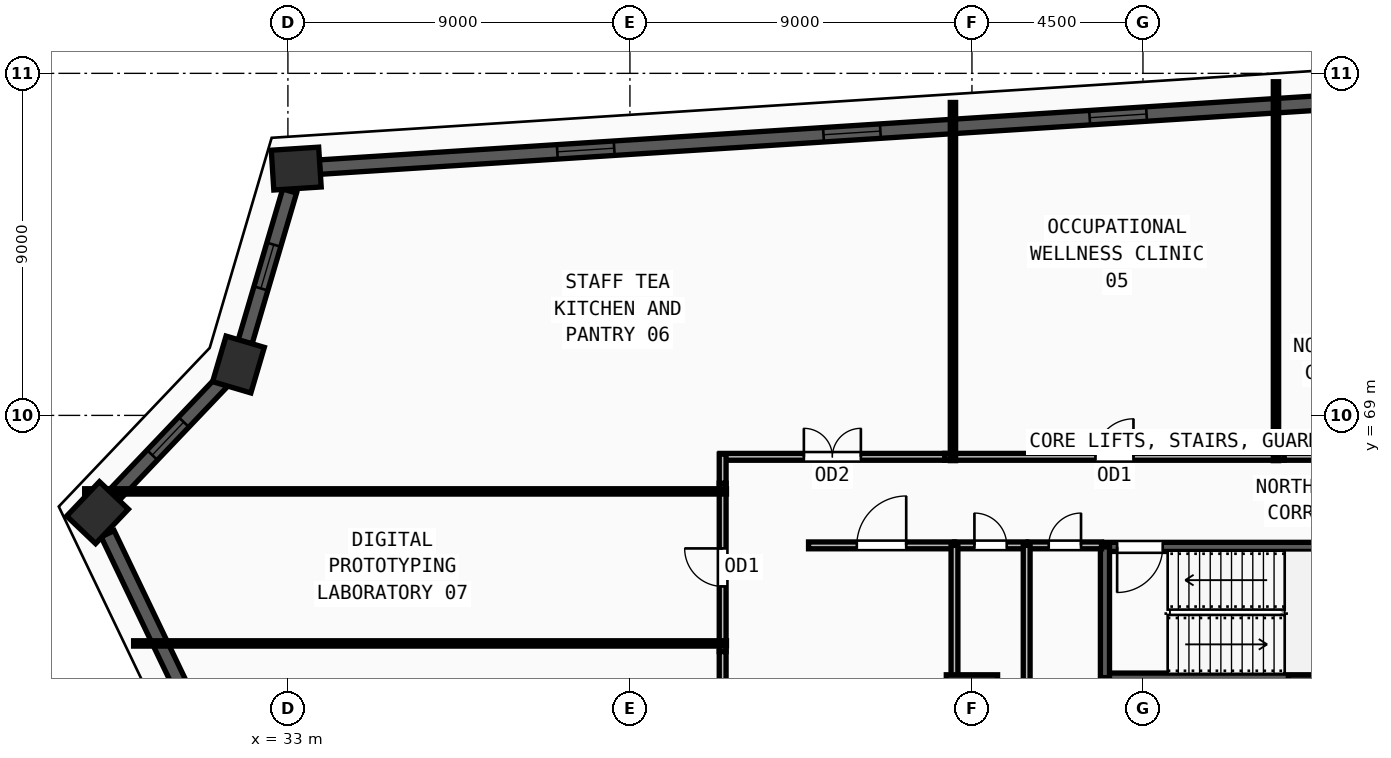
"""IFC4 building model, lengths in metres.
Left out: names, types, materials, properties, quantities, classifications, styles, units other than length and angle.
Written with IfcOpenShell. Run it as: python <this file> out.ifc"""

import sys

from ifc_helpers import new_model, si_unit, direction, frame, frame_2d, origin, origin_2d, place, context, subcontext, project, spatial, rectangle, extrude, source, transform, mapped, element, fill, save


model = new_model("IFC4")
c1 = context("Model", 3, precision=1e-05, world=origin(), true_north=direction((0.0, 1.0)))
c2 = subcontext(c1, "Body", "Model", "MODEL_VIEW")
j1 = project(units=[si_unit("LENGTHUNIT", "METRE"), si_unit("PLANEANGLEUNIT", "RADIAN")], contexts=[c1])
p1 = place(None, origin())
s1 = spatial("IfcSite", under=j1, at=p1, CompositionType="ELEMENT")
p2 = place(p1, origin())
s2 = spatial("IfcBuilding", under=s1, at=p2, CompositionType="ELEMENT")
p3 = place(p2, frame((0.0, 0.0, 247.5)))
s3 = spatial("IfcBuildingStorey", under=s2, at=p3, CompositionType="ELEMENT", Elevation=247.5)
m1 = source(origin(), c2, "Body", "SweptSolid", [
    extrude(rectangle(XDim=1.35, YDim=1.35, at=origin_2d()), origin(), (0.0, 0.0, 1.0), 3.75),
])
for number, where, z_axis, x_axis in (
    (1, (60.0, 61.5, 0.0), (0.0, 0.0, 1.0), (1.0, 0.0, 0.0)),
    (2, (51.0, 61.5, 0.0), (0.0, 0.0, 1.0), (1.0, 0.0, 0.0)),
):
    element("IfcColumn", number, at=place(p3, frame(where, z_axis=z_axis, x_axis=x_axis)), inside=s3, PredefinedType="COLUMN", context=c2, shape_type="MappedRepresentation", body=[
        mapped(m1, transform((0.0, 0.0, 0.0), x_axis=(1.0, 0.0, 0.0), y_axis=(0.0, 1.0, 0.0), z_axis=(0.0, 0.0, 1.0), scale=1.0)),
    ])
m2 = source(origin(), c2, "Body", "SweptSolid", [
    extrude(rectangle(XDim=1.25, YDim=1.05, at=origin_2d()), origin(), (0.0, 0.0, 1.0), 3.75),
])
for number, where, z_axis, x_axis in (
    (3, (27.99, 66.441, 0.0), (0.0, 0.0, 1.0), (0.689, 0.724, 0.0)),
    (4, (31.699, 70.339, 0.0), (0.0, 0.0, 1.0), (0.283, 0.959, 0.0)),
    (5, (33.219, 75.494, 0.0), (0.0, 0.0, 1.0), (0.998, 0.064, 0.0)),
):
    element("IfcColumn", number, at=place(p3, frame(where, z_axis=z_axis, x_axis=x_axis)), inside=s3, PredefinedType="COLUMN", context=c2, shape_type="MappedRepresentation", body=[
        mapped(m2, transform((0.0, 0.0, 0.0), x_axis=(1.0, 0.0, 0.0), y_axis=(0.0, 1.0, 0.0), z_axis=(0.0, 0.0, 1.0), scale=1.0)),
    ])
p4 = place(p3, frame((61.85, 77.331, 0.0), z_axis=(0.0, 0.0, 1.0), x_axis=(-0.997946898195, -0.064046767155, 0.0)))
e6 = element("IfcWall", 6, at=p4, inside=s3, PredefinedType="SOLIDWALL", context=c2, shape_type="SweptSolid", body=[
    extrude(rectangle(XDim=28.075, YDim=0.38, at=frame_2d((14.037, 0.0))), origin(), (0.0, 0.0, 1.0), 3.57),
])
m3 = source(origin(), c2, "Body", "SweptSolid", [
    extrude(rectangle(XDim=1.5, YDim=1.9, at=frame_2d((0.75, 0.95))), frame((0.0, 0.2, 0.0), z_axis=(0.0, -1.0, 0.0), x_axis=(1.0, 0.0, 0.0)), (0.0, 0.0, 1.0), 0.4),
])
p5 = place(p4, frame((6.269, 0.0, 0.55)))
e7 = element("IfcOpeningElement", 7, at=p5, cuts=e6, PredefinedType="OPENING", context=c2, shape_type="MappedRepresentation", body=[
    mapped(m3, transform((0.0, 0.0, 0.0), x_axis=(1.0, 0.0, 0.0), y_axis=(0.0, 1.0, 0.0), z_axis=(0.0, 0.0, 1.0), scale=1.0)),
])
p6 = place(p4, frame((13.287, 0.0, 0.55)))
e8 = element("IfcOpeningElement", 8, at=p6, cuts=e6, PredefinedType="OPENING", context=c2, shape_type="MappedRepresentation", body=[
    mapped(m3, transform((0.0, 0.0, 0.0), x_axis=(1.0, 0.0, 0.0), y_axis=(0.0, 1.0, 0.0), z_axis=(0.0, 0.0, 1.0), scale=1.0)),
])
p7 = place(p4, frame((20.306, 0.0, 0.55)))
e9 = element("IfcOpeningElement", 9, at=p7, cuts=e6, PredefinedType="OPENING", context=c2, shape_type="MappedRepresentation", body=[
    mapped(m3, transform((0.0, 0.0, 0.0), x_axis=(1.0, 0.0, 0.0), y_axis=(0.0, 1.0, 0.0), z_axis=(0.0, 0.0, 1.0), scale=1.0)),
])
p8 = place(p3, frame((33.045, 74.904, 0.0), z_axis=(0.0, 0.0, 1.0), x_axis=(-0.282772261865, -0.959187076602, 0.0)))
e10 = element("IfcWall", 10, at=p8, inside=s3, PredefinedType="SOLIDWALL", context=c2, shape_type="SweptSolid", body=[
    extrude(rectangle(XDim=4.144, YDim=0.38, at=frame_2d((2.072, 0.0))), origin(), (0.0, 0.0, 1.0), 3.57),
])
m4 = source(origin(), c2, "Body", "SweptSolid", [
    extrude(rectangle(XDim=1.2, YDim=1.9, at=frame_2d((0.6, 0.95))), frame((0.0, 0.2, 0.0), z_axis=(0.0, -1.0, 0.0), x_axis=(1.0, 0.0, 0.0)), (0.0, 0.0, 1.0), 0.4),
])
p9 = place(p8, frame((1.472, 0.0, 0.55)))
e11 = element("IfcOpeningElement", 11, at=p9, cuts=e10, PredefinedType="OPENING", context=c2, shape_type="MappedRepresentation", body=[
    mapped(m4, transform((0.0, 0.0, 0.0), x_axis=(1.0, 0.0, 0.0), y_axis=(0.0, 1.0, 0.0), z_axis=(0.0, 0.0, 1.0), scale=1.0)),
])
p10 = place(p3, frame((31.275, 69.893, 0.0), z_axis=(0.0, 0.0, 1.0), x_axis=(-0.689387760278, -0.724392515131, 0.0)))
e12 = element("IfcWall", 12, at=p10, inside=s3, PredefinedType="SOLIDWALL", context=c2, shape_type="SweptSolid", body=[
    extrude(rectangle(XDim=4.15, YDim=0.38, at=frame_2d((2.075, 0.0))), origin(), (0.0, 0.0, 1.0), 3.57),
])
p11 = place(p10, frame((1.475, 0.0, 0.55)))
e13 = element("IfcOpeningElement", 13, at=p11, cuts=e12, PredefinedType="OPENING", context=c2, shape_type="MappedRepresentation", body=[
    mapped(m4, transform((0.0, 0.0, 0.0), x_axis=(1.0, 0.0, 0.0), y_axis=(0.0, 1.0, 0.0), z_axis=(0.0, 0.0, 1.0), scale=1.0)),
])
p12 = place(p3, frame((28.256, 65.886, 0.0), z_axis=(0.0, 0.0, 1.0), x_axis=(0.432167516052, -0.901793345545, 0.0)))
e14 = element("IfcWall", 14, at=p12, inside=s3, PredefinedType="SOLIDWALL", context=c2, shape_type="SweptSolid", body=[
    extrude(rectangle(XDim=23.157, YDim=0.38, at=frame_2d((11.579, 0.0))), origin(), (0.0, 0.0, 1.0), 3.57),
])
p13 = place(p12, frame((5.039, 0.0, 0.55)))
e15 = element("IfcOpeningElement", 15, at=p13, cuts=e14, PredefinedType="OPENING", context=c2, shape_type="MappedRepresentation", body=[
    mapped(m3, transform((0.0, 0.0, 0.0), x_axis=(1.0, 0.0, 0.0), y_axis=(0.0, 1.0, 0.0), z_axis=(0.0, 0.0, 1.0), scale=1.0)),
])
p14 = place(p12, frame((10.829, 0.0, 0.55)))
e16 = element("IfcOpeningElement", 16, at=p14, cuts=e14, PredefinedType="OPENING", context=c2, shape_type="MappedRepresentation", body=[
    mapped(m3, transform((0.0, 0.0, 0.0), x_axis=(1.0, 0.0, 0.0), y_axis=(0.0, 1.0, 0.0), z_axis=(0.0, 0.0, 1.0), scale=1.0)),
])
p15 = place(p12, frame((14.418, 0.0, 0.55)))
e17 = element("IfcOpeningElement", 17, at=p15, cuts=e14, PredefinedType="OPENING", context=c2, shape_type="MappedRepresentation", body=[
    mapped(m3, transform((0.0, 0.0, 0.0), x_axis=(1.0, 0.0, 0.0), y_axis=(0.0, 1.0, 0.0), z_axis=(0.0, 0.0, 1.0), scale=1.0)),
])
p16 = place(p3, frame((54.5, 62.1, 0.0), z_axis=(0.0, 0.0, 1.0), x_axis=(1.0, 0.0, 0.0)))
e18 = element("IfcWall", 18, at=p16, inside=s3, PredefinedType="SOLIDWALL", context=c2, shape_type="SweptSolid", body=[
    extrude(rectangle(XDim=7.82, YDim=0.24, at=frame_2d((3.91, 0.0))), origin(), (0.0, 0.0, 1.0), 3.57),
])
p17 = place(p3, frame((62.32, 65.54, 0.0), z_axis=(0.0, 0.0, 1.0), x_axis=(-1.0, 0.0, 0.0)))
e19 = element("IfcWall", 19, at=p17, inside=s3, PredefinedType="SOLIDWALL", context=c2, shape_type="SweptSolid", body=[
    extrude(rectangle(XDim=7.82, YDim=0.24, at=frame_2d((3.91, 0.0))), origin(), (0.0, 0.0, 1.0), 3.57),
])
m5 = source(origin(), c2, "Body", "SweptSolid", [
    extrude(rectangle(XDim=1.2, YDim=2.2, at=frame_2d((0.6, 1.1))), frame((0.0, 0.13, 0.0), z_axis=(0.0, -1.0, 0.0), x_axis=(1.0, 0.0, 0.0)), (0.0, 0.0, 1.0), 0.26),
])
p18 = place(p17, frame((6.3, 0.0, 0.0)))
e20 = element("IfcOpeningElement", 20, at=p18, cuts=e19, PredefinedType="OPENING", context=c2, shape_type="MappedRepresentation", body=[
    mapped(m5, transform((0.0, 0.0, 0.0), x_axis=(1.0, 0.0, 0.0), y_axis=(0.0, 1.0, 0.0), z_axis=(0.0, 0.0, 1.0), scale=1.0)),
])
p19 = place(p3, frame((54.5, 65.54, 0.0), z_axis=(0.0, 0.0, 1.0), x_axis=(0.0, -1.0, 0.0)))
e21 = element("IfcWall", 21, at=p19, inside=s3, PredefinedType="SOLIDWALL", context=c2, shape_type="SweptSolid", body=[
    extrude(rectangle(XDim=3.44, YDim=0.24, at=frame_2d((1.72, 0.0))), origin(), (0.0, 0.0, 1.0), 3.57),
])
p20 = place(p3, frame((50.54, 65.58, 0.0), z_axis=(0.0, 0.0, 1.0), x_axis=(1.0, 0.0, 0.0)))
e22 = element("IfcWall", 22, at=p20, inside=s3, PredefinedType="PARTITIONING", context=c2, shape_type="SweptSolid", body=[
    extrude(rectangle(XDim=1.9, YDim=0.18, at=frame_2d((0.95, 0.0))), origin(), (0.0, 0.0, 1.0), 3.57),
])
m6 = source(origin(), c2, "Body", "SweptSolid", [
    extrude(rectangle(XDim=0.85, YDim=2.1, at=frame_2d((0.425, 1.05))), frame((0.0, 0.1, 0.0), z_axis=(0.0, -1.0, 0.0), x_axis=(1.0, 0.0, 0.0)), (0.0, 0.0, 1.0), 0.2),
])
p21 = place(p20, frame((0.525, 0.0, 0.0)))
e23 = element("IfcOpeningElement", 23, at=p21, cuts=e22, PredefinedType="OPENING", context=c2, shape_type="MappedRepresentation", body=[
    mapped(m6, transform((0.0, 0.0, 0.0), x_axis=(1.0, 0.0, 0.0), y_axis=(0.0, 1.0, 0.0), z_axis=(0.0, 0.0, 1.0), scale=1.0)),
])
p22 = place(p3, frame((52.48, 65.58, 0.0), z_axis=(0.0, 0.0, 1.0), x_axis=(1.0, 0.0, 0.0)))
e24 = element("IfcWall", 24, at=p22, inside=s3, PredefinedType="PARTITIONING", context=c2, shape_type="SweptSolid", body=[
    extrude(rectangle(XDim=1.93, YDim=0.18, at=frame_2d((0.965, 0.0))), origin(), (0.0, 0.0, 1.0), 3.57),
])
p23 = place(p22, frame((0.54, 0.0, 0.0)))
e25 = element("IfcOpeningElement", 25, at=p23, cuts=e24, PredefinedType="OPENING", context=c2, shape_type="MappedRepresentation", body=[
    mapped(m6, transform((0.0, 0.0, 0.0), x_axis=(1.0, 0.0, 0.0), y_axis=(0.0, 1.0, 0.0), z_axis=(0.0, 0.0, 1.0), scale=1.0)),
])
p24 = place(p3, frame((46.7, 65.58, 0.0), z_axis=(0.0, 0.0, 1.0), x_axis=(1.0, 0.0, 0.0)))
e26 = element("IfcWall", 26, at=p24, inside=s3, PredefinedType="PARTITIONING", context=c2, shape_type="SweptSolid", body=[
    extrude(rectangle(XDim=3.84, YDim=0.18, at=frame_2d((1.92, 0.0))), origin(), (0.0, 0.0, 1.0), 3.57),
])
m7 = source(origin(), c2, "Body", "SweptSolid", [
    extrude(rectangle(XDim=1.3, YDim=2.2, at=frame_2d((0.65, 1.1))), frame((0.0, 0.1, 0.0), z_axis=(0.0, -1.0, 0.0), x_axis=(1.0, 0.0, 0.0)), (0.0, 0.0, 1.0), 0.2),
])
p25 = place(p24, frame((1.27, 0.0, 0.0)))
e27 = element("IfcOpeningElement", 27, at=p25, cuts=e26, PredefinedType="OPENING", context=c2, shape_type="MappedRepresentation", body=[
    mapped(m7, transform((0.0, 0.0, 0.0), x_axis=(1.0, 0.0, 0.0), y_axis=(0.0, 1.0, 0.0), z_axis=(0.0, 0.0, 1.0), scale=1.0)),
])
p26 = place(p3, frame((50.285, 67.91, 0.0), z_axis=(0.0, 0.0, 1.0), x_axis=(1.0, 0.0, 0.0)))
e28 = element("IfcWall", 28, at=p26, inside=s3, PredefinedType="PARTITIONING", context=c2, shape_type="SweptSolid", body=[
    extrude(rectangle(XDim=8.93, YDim=0.18, at=frame_2d((4.465, 0.0))), origin(), (0.0, 0.0, 1.0), 3.205),
])
m8 = source(origin(), c2, "Body", "SweptSolid", [
    extrude(rectangle(XDim=1.0, YDim=2.2, at=frame_2d((0.5, 1.1))), frame((0.0, 0.1, 0.0), z_axis=(0.0, -1.0, 0.0), x_axis=(1.0, 0.0, 0.0)), (0.0, 0.0, 1.0), 0.2),
])
p27 = place(p26, frame((3.965, 0.0, 0.0)))
e29 = element("IfcOpeningElement", 29, at=p27, cuts=e28, PredefinedType="OPENING", context=c2, shape_type="MappedRepresentation", body=[
    mapped(m8, transform((0.0, 0.0, 0.0), x_axis=(1.0, 0.0, 0.0), y_axis=(0.0, 1.0, 0.0), z_axis=(0.0, 0.0, 1.0), scale=1.0)),
])
p28 = place(p3, frame((44.37, 67.91, 0.0), z_axis=(0.0, 0.0, 1.0), x_axis=(1.0, 0.0, 0.0)))
e30 = element("IfcWall", 30, at=p28, inside=s3, PredefinedType="PARTITIONING", context=c2, shape_type="SweptSolid", body=[
    extrude(rectangle(XDim=5.915, YDim=0.18, at=frame_2d((2.958, 0.0))), origin(), (0.0, 0.0, 1.0), 3.205),
])
m9 = source(origin(), c2, "Body", "SweptSolid", [
    extrude(rectangle(XDim=1.5, YDim=2.2, at=frame_2d((0.75, 1.1))), frame((0.0, 0.1, 0.0), z_axis=(0.0, -1.0, 0.0), x_axis=(1.0, 0.0, 0.0)), (0.0, 0.0, 1.0), 0.2),
])
p29 = place(p28, frame((2.207, 0.0, 0.0)))
e31 = element("IfcOpeningElement", 31, at=p29, cuts=e30, PredefinedType="OPENING", context=c2, shape_type="MappedRepresentation", body=[
    mapped(m9, transform((0.0, 0.0, 0.0), x_axis=(1.0, 0.0, 0.0), y_axis=(0.0, 1.0, 0.0), z_axis=(0.0, 0.0, 1.0), scale=1.0)),
])
p30 = place(p3, frame((44.44, 62.785, 0.0), z_axis=(0.0, 0.0, 1.0), x_axis=(0.0, 1.0, 0.0)))
e32 = element("IfcWall", 32, at=p30, inside=s3, PredefinedType="PARTITIONING", context=c2, shape_type="SweptSolid", body=[
    extrude(rectangle(XDim=4.43, YDim=0.18, at=frame_2d((2.215, 0.0))), origin(), (0.0, 0.0, 1.0), 3.57),
])
p31 = place(p30, frame((1.715, 0.0, 0.0)))
e33 = element("IfcOpeningElement", 33, at=p31, cuts=e32, PredefinedType="OPENING", context=c2, shape_type="MappedRepresentation", body=[
    mapped(m8, transform((0.0, 0.0, 0.0), x_axis=(1.0, 0.0, 0.0), y_axis=(0.0, 1.0, 0.0), z_axis=(0.0, 0.0, 1.0), scale=1.0)),
])
p32 = place(p3, frame((44.44, 53.785, 0.0), z_axis=(0.0, 0.0, 1.0), x_axis=(0.0, 1.0, 0.0)))
e34 = element("IfcWall", 34, at=p32, inside=s3, PredefinedType="PARTITIONING", context=c2, shape_type="SweptSolid", body=[
    extrude(rectangle(XDim=9.0, YDim=0.18, at=frame_2d((4.5, 0.0))), origin(), (0.0, 0.0, 1.0), 3.57),
])
p33 = place(p32, frame((4.0, 0.0, 0.0)))
e35 = element("IfcOpeningElement", 35, at=p33, cuts=e34, PredefinedType="OPENING", context=c2, shape_type="MappedRepresentation", body=[
    mapped(m8, transform((0.0, 0.0, 0.0), x_axis=(1.0, 0.0, 0.0), y_axis=(0.0, 1.0, 0.0), z_axis=(0.0, 0.0, 1.0), scale=1.0)),
])
p34 = place(p3, frame((50.54, 61.95, 0.0), z_axis=(0.0, 0.0, 1.0), x_axis=(0.0, 1.0, 0.0)))
e36 = element("IfcWall", 36, at=p34, inside=s3, PredefinedType="PARTITIONING", context=c2, shape_type="SweptSolid", body=[
    extrude(rectangle(XDim=3.63, YDim=0.18, at=frame_2d((1.815, 0.0))), origin(), (0.0, 0.0, 1.0), 3.57),
])
p35 = place(p3, frame((52.44, 61.825, 0.0), z_axis=(0.0, 0.0, 1.0), x_axis=(0.0, 1.0, 0.0)))
e37 = element("IfcWall", 37, at=p35, inside=s3, PredefinedType="PARTITIONING", context=c2, shape_type="SweptSolid", body=[
    extrude(rectangle(XDim=3.755, YDim=0.18, at=frame_2d((1.877, 0.0))), origin(), (0.0, 0.0, 1.0), 3.57),
])
p36 = place(p3, frame((59.215, 67.91, 0.0), z_axis=(0.0, 0.0, 1.0), x_axis=(1.0, 0.0, 0.0)))
e38 = element("IfcWall", 38, at=p36, inside=s3, PredefinedType="PARTITIONING", context=c2, shape_type="SweptSolid", body=[
    extrude(rectangle(XDim=3.995, YDim=0.18, at=frame_2d((1.998, 0.0))), origin(), (0.0, 0.0, 1.0), 3.57),
])
p37 = place(p3, frame((44.44, 67.215, 0.0), z_axis=(0.0, 0.0, 1.0), x_axis=(0.0, 1.0, 0.0)))
e39 = element("IfcWall", 39, at=p37, inside=s3, PredefinedType="PARTITIONING", context=c2, shape_type="SweptSolid", body=[
    extrude(rectangle(XDim=0.765, YDim=0.18, at=frame_2d((0.382, 0.0))), origin(), (0.0, 0.0, 1.0), 3.57),
])
p38 = place(p3, frame((44.54, 63.0, 0.0), z_axis=(0.0, 0.0, 1.0), x_axis=(-1.0, 0.0, 0.0)))
e40 = element("IfcWall", 40, at=p38, inside=s3, PredefinedType="PARTITIONING", context=c2, shape_type="SweptSolid", body=[
    extrude(rectangle(XDim=15.6, YDim=0.14, at=frame_2d((7.8, 0.0))), origin(), (0.0, 0.0, 1.0), 2.855),
])
p39 = place(p3, frame((44.54, 67.0, 0.0), z_axis=(0.0, 0.0, 1.0), x_axis=(-1.0, 0.0, 0.0)))
e41 = element("IfcWall", 41, at=p39, inside=s3, PredefinedType="PARTITIONING", context=c2, shape_type="SweptSolid", body=[
    extrude(rectangle(XDim=16.888, YDim=0.14, at=frame_2d((8.444, 0.0))), origin(), (0.0, 0.0, 1.0), 3.57),
])
p40 = place(p3, frame((50.5, 67.81, 0.0), z_axis=(0.0, 0.0, 1.0), x_axis=(0.0, 1.0, 0.0)))
e42 = element("IfcWall", 42, at=p40, inside=s3, PredefinedType="PARTITIONING", context=c2, shape_type="SweptSolid", body=[
    extrude(rectangle(XDim=9.424, YDim=0.14, at=frame_2d((4.712, 0.0))), origin(), (0.0, 0.0, 1.0), 3.57),
])
p41 = place(p3, frame((59.0, 67.81, 0.0), z_axis=(0.0, 0.0, 1.0), x_axis=(0.0, 1.0, 0.0)))
e43 = element("IfcWall", 43, at=p41, inside=s3, PredefinedType="PARTITIONING", context=c2, shape_type="SweptSolid", body=[
    extrude(rectangle(XDim=9.969, YDim=0.14, at=frame_2d((4.984, 0.0))), origin(), (0.0, 0.0, 1.0), 3.57),
])
m10 = source(origin(), c2, "Body", "SweptSolid", [
    extrude(rectangle(XDim=1.5, YDim=1.9, at=frame_2d((0.75, 0.95))), frame((0.0, 0.03, 0.0), z_axis=(0.0, -1.0, 0.0), x_axis=(1.0, 0.0, 0.0)), (0.0, 0.0, 1.0), 0.06),
])
p42 = place(p5, origin())
e44 = element("IfcWindow", 44, at=p42, inside=s3, PartitioningType="DOUBLE_PANEL_VERTICAL", PredefinedType="WINDOW", context=c2, shape_type="MappedRepresentation", body=[
    mapped(m10, transform((0.0, 0.0, 0.0), x_axis=(1.0, 0.0, 0.0), y_axis=(0.0, 1.0, 0.0), z_axis=(0.0, 0.0, 1.0), scale=1.0)),
])
fill(e7, e44)
p43 = place(p6, origin())
e45 = element("IfcWindow", 45, at=p43, inside=s3, PartitioningType="DOUBLE_PANEL_VERTICAL", PredefinedType="WINDOW", context=c2, shape_type="MappedRepresentation", body=[
    mapped(m10, transform((0.0, 0.0, 0.0), x_axis=(1.0, 0.0, 0.0), y_axis=(0.0, 1.0, 0.0), z_axis=(0.0, 0.0, 1.0), scale=1.0)),
])
fill(e8, e45)
p44 = place(p7, origin())
e46 = element("IfcWindow", 46, at=p44, inside=s3, PartitioningType="DOUBLE_PANEL_VERTICAL", PredefinedType="WINDOW", context=c2, shape_type="MappedRepresentation", body=[
    mapped(m10, transform((0.0, 0.0, 0.0), x_axis=(1.0, 0.0, 0.0), y_axis=(0.0, 1.0, 0.0), z_axis=(0.0, 0.0, 1.0), scale=1.0)),
])
fill(e9, e46)
m11 = source(origin(), c2, "Body", "SweptSolid", [
    extrude(rectangle(XDim=1.2, YDim=1.9, at=frame_2d((0.6, 0.95))), frame((0.0, 0.03, 0.0), z_axis=(0.0, -1.0, 0.0), x_axis=(1.0, 0.0, 0.0)), (0.0, 0.0, 1.0), 0.06),
])
p45 = place(p9, origin())
e47 = element("IfcWindow", 47, at=p45, inside=s3, PartitioningType="SINGLE_PANEL", PredefinedType="WINDOW", context=c2, shape_type="MappedRepresentation", body=[
    mapped(m11, transform((0.0, 0.0, 0.0), x_axis=(1.0, 0.0, 0.0), y_axis=(0.0, 1.0, 0.0), z_axis=(0.0, 0.0, 1.0), scale=1.0)),
])
fill(e11, e47)
p46 = place(p11, origin())
e48 = element("IfcWindow", 48, at=p46, inside=s3, PartitioningType="SINGLE_PANEL", PredefinedType="WINDOW", context=c2, shape_type="MappedRepresentation", body=[
    mapped(m11, transform((0.0, 0.0, 0.0), x_axis=(1.0, 0.0, 0.0), y_axis=(0.0, 1.0, 0.0), z_axis=(0.0, 0.0, 1.0), scale=1.0)),
])
fill(e13, e48)
m12 = source(origin(), c2, "Body", "SweptSolid", [
    extrude(rectangle(XDim=1.2, YDim=2.2, at=frame_2d((0.6, 1.1))), frame((0.0, 0.025, 0.0), z_axis=(0.0, -1.0, 0.0), x_axis=(1.0, 0.0, 0.0)), (0.0, 0.0, 1.0), 0.05),
])
p47 = place(p18, origin())
e49 = element("IfcDoor", 49, at=p47, inside=s3, OperationType="SINGLE_SWING_RIGHT", PredefinedType="DOOR", context=c2, shape_type="MappedRepresentation", body=[
    mapped(m12, transform((0.0, 0.0, 0.0), x_axis=(1.0, 0.0, 0.0), y_axis=(0.0, 1.0, 0.0), z_axis=(0.0, 0.0, 1.0), scale=1.0)),
])
fill(e20, e49)
m13 = source(origin(), c2, "Body", "SweptSolid", [
    extrude(rectangle(XDim=0.85, YDim=2.1, at=frame_2d((0.425, 1.05))), frame((0.0, 0.025, 0.0), z_axis=(0.0, -1.0, 0.0), x_axis=(1.0, 0.0, 0.0)), (0.0, 0.0, 1.0), 0.05),
])
p48 = place(p21, origin())
e50 = element("IfcDoor", 50, at=p48, inside=s3, OperationType="SINGLE_SWING_LEFT", PredefinedType="DOOR", context=c2, shape_type="MappedRepresentation", body=[
    mapped(m13, transform((0.0, 0.0, 0.0), x_axis=(1.0, 0.0, 0.0), y_axis=(0.0, 1.0, 0.0), z_axis=(0.0, 0.0, 1.0), scale=1.0)),
])
fill(e23, e50)
p49 = place(p23, origin())
e51 = element("IfcDoor", 51, at=p49, inside=s3, OperationType="SINGLE_SWING_RIGHT", PredefinedType="DOOR", context=c2, shape_type="MappedRepresentation", body=[
    mapped(m13, transform((0.0, 0.0, 0.0), x_axis=(1.0, 0.0, 0.0), y_axis=(0.0, 1.0, 0.0), z_axis=(0.0, 0.0, 1.0), scale=1.0)),
])
fill(e25, e51)
m14 = source(origin(), c2, "Body", "SweptSolid", [
    extrude(rectangle(XDim=1.3, YDim=2.2, at=frame_2d((0.65, 1.1))), frame((0.0, 0.025, 0.0), z_axis=(0.0, -1.0, 0.0), x_axis=(1.0, 0.0, 0.0)), (0.0, 0.0, 1.0), 0.05),
])
p50 = place(p25, origin())
e52 = element("IfcDoor", 52, at=p50, inside=s3, OperationType="SINGLE_SWING_RIGHT", PredefinedType="DOOR", context=c2, shape_type="MappedRepresentation", body=[
    mapped(m14, transform((0.0, 0.0, 0.0), x_axis=(1.0, 0.0, 0.0), y_axis=(0.0, 1.0, 0.0), z_axis=(0.0, 0.0, 1.0), scale=1.0)),
])
fill(e27, e52)
m15 = source(origin(), c2, "Body", "SweptSolid", [
    extrude(rectangle(XDim=1.0, YDim=2.2, at=frame_2d((0.5, 1.1))), frame((0.0, 0.025, 0.0), z_axis=(0.0, -1.0, 0.0), x_axis=(1.0, 0.0, 0.0)), (0.0, 0.0, 1.0), 0.05),
])
p51 = place(p27, origin())
e53 = element("IfcDoor", 53, at=p51, inside=s3, OperationType="SINGLE_SWING_RIGHT", PredefinedType="DOOR", context=c2, shape_type="MappedRepresentation", body=[
    mapped(m15, transform((0.0, 0.0, 0.0), x_axis=(1.0, 0.0, 0.0), y_axis=(0.0, 1.0, 0.0), z_axis=(0.0, 0.0, 1.0), scale=1.0)),
])
fill(e29, e53)
m16 = source(origin(), c2, "Body", "SweptSolid", [
    extrude(rectangle(XDim=1.5, YDim=2.2, at=frame_2d((0.75, 1.1))), frame((0.0, 0.025, 0.0), z_axis=(0.0, -1.0, 0.0), x_axis=(1.0, 0.0, 0.0)), (0.0, 0.0, 1.0), 0.05),
])
p52 = place(p29, origin())
e54 = element("IfcDoor", 54, at=p52, inside=s3, OperationType="DOUBLE_DOOR_SINGLE_SWING", PredefinedType="DOOR", context=c2, shape_type="MappedRepresentation", body=[
    mapped(m16, transform((0.0, 0.0, 0.0), x_axis=(1.0, 0.0, 0.0), y_axis=(0.0, 1.0, 0.0), z_axis=(0.0, 0.0, 1.0), scale=1.0)),
])
fill(e31, e54)
p53 = place(p31, origin())
e55 = element("IfcDoor", 55, at=p53, inside=s3, OperationType="SINGLE_SWING_RIGHT", PredefinedType="DOOR", context=c2, shape_type="MappedRepresentation", body=[
    mapped(m15, transform((0.0, 0.0, 0.0), x_axis=(1.0, 0.0, 0.0), y_axis=(0.0, 1.0, 0.0), z_axis=(0.0, 0.0, 1.0), scale=1.0)),
])
fill(e33, e55)
save(model, sys.argv[1])
